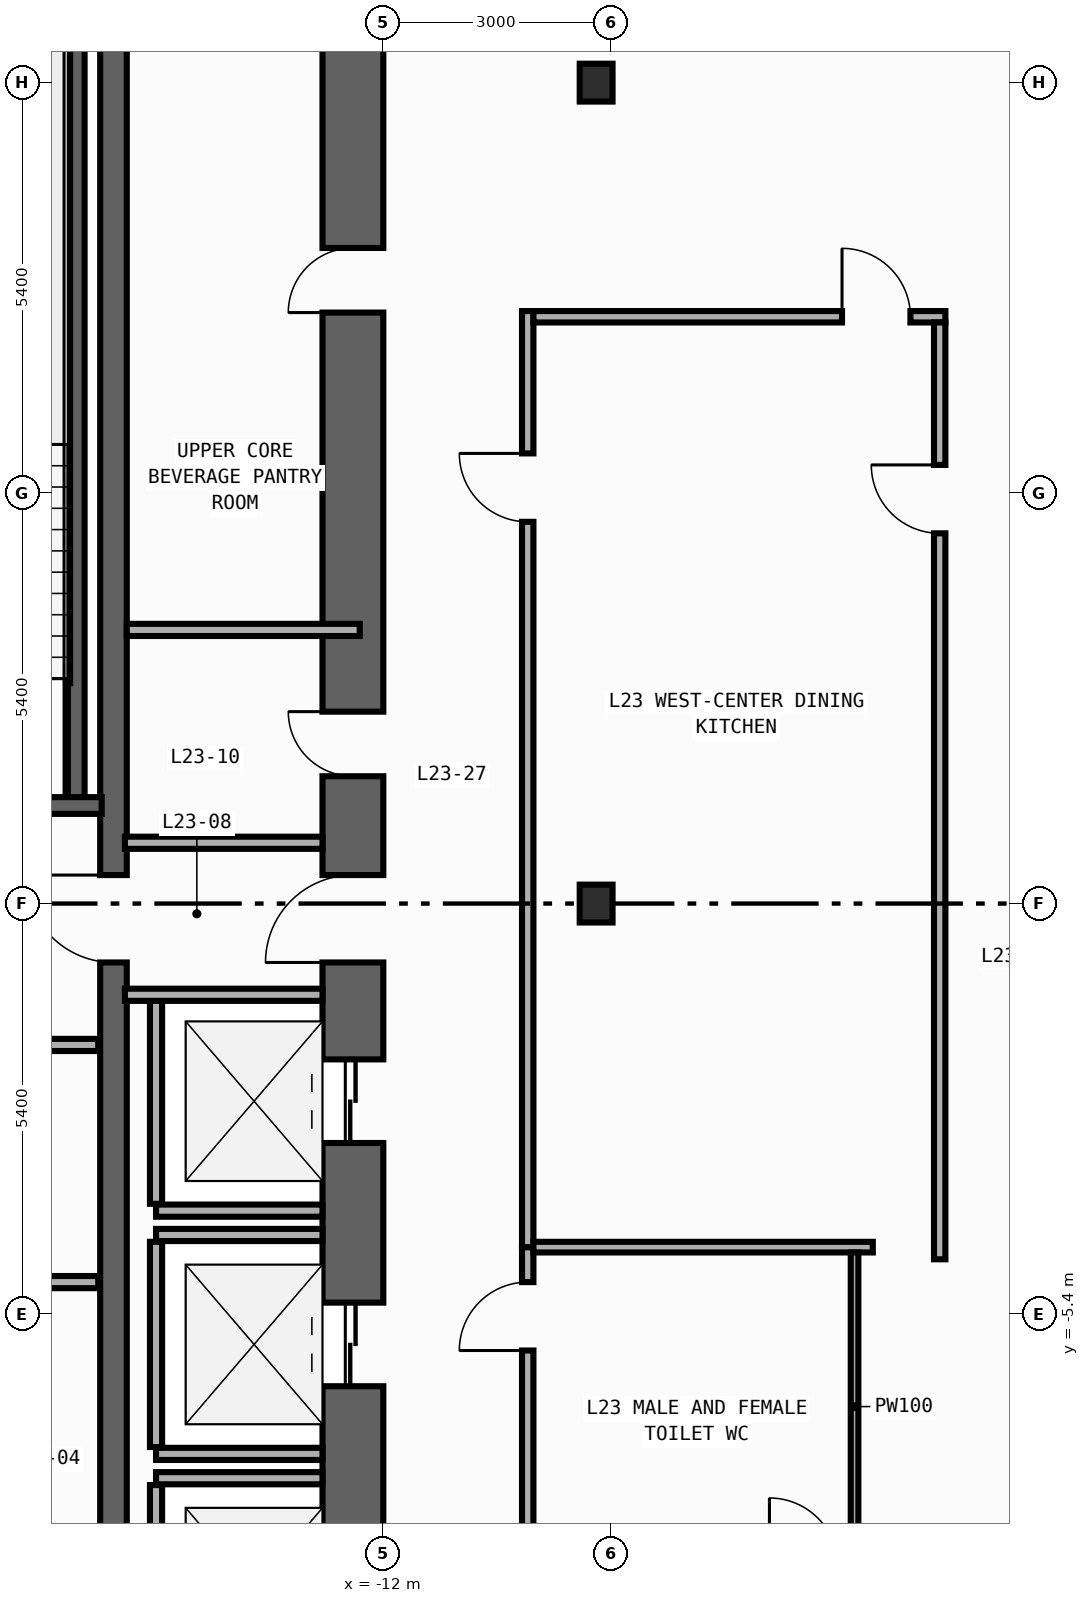
"""IFC4 building model, lengths in metres.
Left out: names, types, materials, properties, quantities, classifications, styles, units other than length and angle.
Written with IfcOpenShell. Run it as: python <this file> out.ifc"""

import sys

from ifc_helpers import new_model, si_unit, direction, frame, frame_2d, origin, origin_2d, place, context, subcontext, project, spatial, rectangle, i_section, extrude, element, fill, save


model = new_model("IFC4")
c1 = context("Model", 3, precision=1e-05, world=origin(), true_north=direction((0.0, 1.0)))
c2 = subcontext(c1, "Body", "Model", "MODEL_VIEW")
j1 = project(units=[si_unit("LENGTHUNIT", "METRE"), si_unit("PLANEANGLEUNIT", "RADIAN")], contexts=[c1])
p1 = place(None, origin())
s1 = spatial("IfcSite", under=j1, at=p1, CompositionType="ELEMENT")
p2 = place(p1, origin())
s2 = spatial("IfcBuilding", under=s1, at=p2, CompositionType="ELEMENT")
p3 = place(p2, frame((0.0, 0.0, 101.6)))
s3 = spatial("IfcBuildingStorey", under=s2, at=p3, CompositionType="ELEMENT", Elevation=101.6)
p4 = place(p3, frame((-12.4, -13.5, 0.0), z_axis=(0.0, 0.0, 1.0), x_axis=(0.0, 1.0, 0.0)))
e1 = element("IfcWall", 1, at=p4, inside=s3, PredefinedType="SHEAR", context=c2, shape_type="SweptSolid", body=[
    extrude(rectangle(XDim=27.0, YDim=0.8, at=frame_2d((13.5, 0.0))), origin(), (0.0, 0.0, 1.0), 3.94),
])
p5 = place(p4, frame((10.35, 0.0, 0.0)))
e2 = element("IfcOpeningElement", 2, at=p5, cuts=e1, PredefinedType="OPENING", context=c2, shape_type="SweptSolid", body=[
    extrude(rectangle(XDim=1.1, YDim=2.2, at=frame_2d((0.55, 1.1))), frame((0.0, 0.41, 0.0), z_axis=(0.0, -1.0, 0.0), x_axis=(1.0, 0.0, 0.0)), (0.0, 0.0, 1.0), 0.82),
])
p6 = place(p4, frame((7.15, 0.0, 0.0)))
e3 = element("IfcOpeningElement", 3, at=p6, cuts=e1, PredefinedType="OPENING", context=c2, shape_type="SweptSolid", body=[
    extrude(rectangle(XDim=1.1, YDim=2.2, at=frame_2d((0.55, 1.1))), frame((0.0, 0.41, 0.0), z_axis=(0.0, -1.0, 0.0), x_axis=(1.0, 0.0, 0.0)), (0.0, 0.0, 1.0), 0.82),
])
p7 = place(p4, frame((3.95, 0.0, 0.0)))
e4 = element("IfcOpeningElement", 4, at=p7, cuts=e1, PredefinedType="OPENING", context=c2, shape_type="SweptSolid", body=[
    extrude(rectangle(XDim=1.1, YDim=2.2, at=frame_2d((0.55, 1.1))), frame((0.0, 0.41, 0.0), z_axis=(0.0, -1.0, 0.0), x_axis=(1.0, 0.0, 0.0)), (0.0, 0.0, 1.0), 0.82),
])
p8 = place(p4, frame((15.175, 0.0, 0.0)))
e5 = element("IfcOpeningElement", 5, at=p8, cuts=e1, PredefinedType="OPENING", context=c2, shape_type="SweptSolid", body=[
    extrude(rectangle(XDim=0.85, YDim=2.1, at=frame_2d((0.425, 1.05))), frame((0.0, 0.41, 0.0), z_axis=(0.0, -1.0, 0.0), x_axis=(1.0, 0.0, 0.0)), (0.0, 0.0, 1.0), 0.82),
])
p9 = place(p4, frame((21.275, 0.0, 0.0)))
e6 = element("IfcOpeningElement", 6, at=p9, cuts=e1, PredefinedType="OPENING", context=c2, shape_type="SweptSolid", body=[
    extrude(rectangle(XDim=0.85, YDim=2.1, at=frame_2d((0.425, 1.05))), frame((0.0, 0.41, 0.0), z_axis=(0.0, -1.0, 0.0), x_axis=(1.0, 0.0, 0.0)), (0.0, 0.0, 1.0), 0.82),
])
p10 = place(p4, frame((12.725, 0.0, 0.0)))
e7 = element("IfcOpeningElement", 7, at=p10, cuts=e1, PredefinedType="OPENING", context=c2, shape_type="SweptSolid", body=[
    extrude(rectangle(XDim=1.15, YDim=2.2, at=frame_2d((0.575, 1.1))), frame((0.0, 0.41, 0.0), z_axis=(0.0, -1.0, 0.0), x_axis=(1.0, 0.0, 0.0)), (0.0, 0.0, 1.0), 0.82),
])
p11 = place(p4, frame((1.625, 0.0, 0.0)))
e8 = element("IfcOpeningElement", 8, at=p11, cuts=e1, PredefinedType="OPENING", context=c2, shape_type="SweptSolid", body=[
    extrude(rectangle(XDim=0.85, YDim=2.1, at=frame_2d((0.425, 1.05))), frame((0.0, 0.41, 0.0), z_axis=(0.0, -1.0, 0.0), x_axis=(1.0, 0.0, 0.0)), (0.0, 0.0, 1.0), 0.82),
])
p12 = place(p3, frame((-15.55, -12.7, 0.0), z_axis=(0.0, 0.0, 1.0), x_axis=(0.0, 1.0, 0.0)))
e9 = element("IfcWall", 9, at=p12, inside=s3, PredefinedType="SHEAR", context=c2, shape_type="SweptSolid", body=[
    extrude(rectangle(XDim=25.4, YDim=0.35, at=frame_2d((12.7, 0.0))), origin(), (0.0, 0.0, 1.0), 3.94),
])
p13 = place(p12, frame((11.925, 0.0, 0.0)))
e10 = element("IfcOpeningElement", 10, at=p13, cuts=e9, PredefinedType="OPENING", context=c2, shape_type="SweptSolid", body=[
    extrude(rectangle(XDim=1.15, YDim=2.2, at=frame_2d((0.575, 1.1))), frame((0.0, 0.185, 0.0), z_axis=(0.0, -1.0, 0.0), x_axis=(1.0, 0.0, 0.0)), (0.0, 0.0, 1.0), 0.37),
])
p14 = place(p12, frame((0.825, 0.0, 0.0)))
e11 = element("IfcOpeningElement", 11, at=p14, cuts=e9, PredefinedType="OPENING", context=c2, shape_type="SweptSolid", body=[
    extrude(rectangle(XDim=0.85, YDim=2.1, at=frame_2d((0.425, 1.05))), frame((0.0, 0.185, 0.0), z_axis=(0.0, -1.0, 0.0), x_axis=(1.0, 0.0, 0.0)), (0.0, 0.0, 1.0), 0.37),
])
p15 = place(p3, frame((-16.04, 1.29, 0.0), z_axis=(0.0, 0.0, 1.0), x_axis=(0.0, 1.0, 0.0)))
e12 = element("IfcWall", 12, at=p15, inside=s3, PredefinedType="SHEAR", context=c2, shape_type="SweptSolid", body=[
    extrude(rectangle(XDim=11.3, YDim=0.22, at=frame_2d((5.65, 0.0))), origin(), (0.0, 0.0, 1.0), 3.94),
])
p16 = place(p3, frame((-19.62, 1.29, 0.0), z_axis=(0.0, 0.0, 1.0), x_axis=(1.0, 0.0, 0.0)))
e13 = element("IfcWall", 13, at=p16, inside=s3, PredefinedType="SHEAR", context=c2, shape_type="SweptSolid", body=[
    extrude(rectangle(XDim=3.915, YDim=0.22, at=frame_2d((1.958, 0.0))), origin(), (0.0, 0.0, 1.0), 3.94),
])
p17 = place(p16, frame((1.08, 0.0, 0.0)))
e14 = element("IfcOpeningElement", 14, at=p17, cuts=e13, PredefinedType="OPENING", context=c2, shape_type="SweptSolid", body=[
    extrude(rectangle(XDim=1.1, YDim=2.2, at=frame_2d((0.55, 1.1))), frame((0.0, 0.12, 0.0), z_axis=(0.0, -1.0, 0.0), x_axis=(1.0, 0.0, 0.0)), (0.0, 0.0, 1.0), 0.24),
])
for number, where, z_axis, x_axis in (
    (15, (-9.2, 0.0, 0.0), (0.0, 0.0, 1.0), (1.0, 0.0, 0.0)),
    (16, (-9.2, 10.8, 0.0), (0.0, 0.0, 1.0), (1.0, 0.0, 0.0)),
):
    element("IfcColumn", number, at=place(p3, frame(where, z_axis=z_axis, x_axis=x_axis)), inside=s3, PredefinedType="COLUMN", context=c2, shape_type="SweptSolid", body=[
        extrude(i_section(OverallWidth=0.432, OverallDepth=0.498, WebThickness=0.045, FlangeThickness=0.07, FilletRadius=0.022, at=origin_2d()), origin(), (0.0, 0.0, 1.0), 4.2),
    ])
p18 = place(p3, frame((-14.99, -4.04, 0.0), z_axis=(0.0, 0.0, 1.0), x_axis=(1.0, 0.0, 0.0)))
e17 = element("IfcWall", 17, at=p18, inside=s3, PredefinedType="STANDARD", context=c2, shape_type="SweptSolid", body=[
    extrude(rectangle(XDim=2.19, YDim=0.16, at=frame_2d((1.095, 0.0))), origin(), (0.0, 0.0, 1.0), 3.94),
])
p19 = place(p3, frame((-14.99, -3.95, 0.0), z_axis=(0.0, 0.0, 1.0), x_axis=(0.0, 1.0, 0.0)))
e18 = element("IfcWall", 18, at=p19, inside=s3, PredefinedType="STANDARD", context=c2, shape_type="SweptSolid", body=[
    extrude(rectangle(XDim=2.7, YDim=0.16, at=frame_2d((1.35, 0.0))), origin(), (0.0, 0.0, 1.0), 3.94),
])
for number, where, z_axis, x_axis in (
    (19, (-14.99, -7.24, 0.0), (0.0, 0.0, 1.0), (1.0, 0.0, 0.0)),
    (20, (-14.99, -4.36, 0.0), (0.0, 0.0, 1.0), (1.0, 0.0, 0.0)),
):
    element("IfcWall", number, at=place(p3, frame(where, z_axis=z_axis, x_axis=x_axis)), inside=s3, PredefinedType="STANDARD", context=c2, shape_type="SweptSolid", body=[
        extrude(rectangle(XDim=2.19, YDim=0.16, at=frame_2d((1.095, 0.0))), origin(), (0.0, 0.0, 1.0), 3.94),
    ])
p20 = place(p3, frame((-14.99, -7.15, 0.0), z_axis=(0.0, 0.0, 1.0), x_axis=(0.0, 1.0, 0.0)))
e21 = element("IfcWall", 21, at=p20, inside=s3, PredefinedType="STANDARD", context=c2, shape_type="SweptSolid", body=[
    extrude(rectangle(XDim=2.7, YDim=0.16, at=frame_2d((1.35, 0.0))), origin(), (0.0, 0.0, 1.0), 3.94),
])
p21 = place(p3, frame((-14.99, -7.56, 0.0), z_axis=(0.0, 0.0, 1.0), x_axis=(1.0, 0.0, 0.0)))
e22 = element("IfcWall", 22, at=p21, inside=s3, PredefinedType="STANDARD", context=c2, shape_type="SweptSolid", body=[
    extrude(rectangle(XDim=2.19, YDim=0.16, at=frame_2d((1.095, 0.0))), origin(), (0.0, 0.0, 1.0), 3.94),
])
p22 = place(p3, frame((-14.99, -10.35, 0.0), z_axis=(0.0, 0.0, 1.0), x_axis=(0.0, 1.0, 0.0)))
e23 = element("IfcWall", 23, at=p22, inside=s3, PredefinedType="STANDARD", context=c2, shape_type="SweptSolid", body=[
    extrude(rectangle(XDim=2.7, YDim=0.16, at=frame_2d((1.35, 0.0))), origin(), (0.0, 0.0, 1.0), 3.94),
])
p23 = place(p3, frame((-19.55, -1.86, 0.0), z_axis=(0.0, 0.0, 1.0), x_axis=(1.0, 0.0, 0.0)))
e24 = element("IfcWall", 24, at=p23, inside=s3, PredefinedType="STANDARD", context=c2, shape_type="SweptSolid", body=[
    extrude(rectangle(XDim=3.8, YDim=0.16, at=frame_2d((1.9, 0.0))), origin(), (0.0, 0.0, 1.0), 3.94),
])
p24 = place(p23, frame((1.18, 0.0, 0.0)))
e25 = element("IfcOpeningElement", 25, at=p24, cuts=e24, PredefinedType="OPENING", context=c2, shape_type="SweptSolid", body=[
    extrude(rectangle(XDim=1.15, YDim=2.2, at=frame_2d((0.575, 1.1))), frame((0.0, 0.09, 0.0), z_axis=(0.0, -1.0, 0.0), x_axis=(1.0, 0.0, 0.0)), (0.0, 0.0, 1.0), 0.18),
])
p25 = place(p3, frame((-19.55, -4.98, 0.0), z_axis=(0.0, 0.0, 1.0), x_axis=(1.0, 0.0, 0.0)))
e26 = element("IfcWall", 26, at=p25, inside=s3, PredefinedType="STANDARD", context=c2, shape_type="SweptSolid", body=[
    extrude(rectangle(XDim=3.8, YDim=0.16, at=frame_2d((1.9, 0.0))), origin(), (0.0, 0.0, 1.0), 3.94),
])
for number, where, z_axis, x_axis in (
    (27, (-15.4, 0.8, 0.0), (0.0, 0.0, 1.0), (1.0, 0.0, 0.0)),
    (28, (-15.4, -1.2, 0.0), (0.0, 0.0, 1.0), (1.0, 0.0, 0.0)),
):
    element("IfcWall", number, at=place(p3, frame(where, z_axis=z_axis, x_axis=x_axis)), inside=s3, PredefinedType="STANDARD", context=c2, shape_type="SweptSolid", body=[
        extrude(rectangle(XDim=2.6, YDim=0.16, at=frame_2d((1.3, 0.0))), origin(), (0.0, 0.0, 1.0), 3.94),
    ])
p26 = place(p3, frame((-15.375, 3.6, 0.0), z_axis=(0.0, 0.0, 1.0), x_axis=(1.0, 0.0, 0.0)))
e29 = element("IfcWall", 29, at=p26, inside=s3, PredefinedType="PARTITIONING", context=c2, shape_type="SweptSolid", body=[
    extrude(rectangle(XDim=3.065, YDim=0.16, at=frame_2d((1.532, 0.0))), origin(), (0.0, 0.0, 1.0), 3.94),
])
p27 = place(p3, frame((-10.1, -8.795, 0.0), z_axis=(0.0, 0.0, 1.0), x_axis=(0.0, 1.0, 0.0)))
e30 = element("IfcWall", 30, at=p27, inside=s3, PredefinedType="PARTITIONING", context=c2, shape_type="SweptSolid", body=[
    extrude(rectangle(XDim=4.275, YDim=0.15, at=frame_2d((2.137, 0.0))), origin(), (0.0, 0.0, 1.0), 3.94),
])
p28 = place(p27, frame((2.915, 0.0, 0.0)))
e31 = element("IfcOpeningElement", 31, at=p28, cuts=e30, PredefinedType="OPENING", context=c2, shape_type="SweptSolid", body=[
    extrude(rectangle(XDim=0.9, YDim=2.15, at=frame_2d((0.45, 1.075))), frame((0.0, 0.085, 0.0), z_axis=(0.0, -1.0, 0.0), x_axis=(1.0, 0.0, 0.0)), (0.0, 0.0, 1.0), 0.17),
])
p29 = place(p3, frame((-10.1, -4.52, 0.0), z_axis=(0.0, 0.0, 1.0), x_axis=(0.0, 1.0, 0.0)))
e32 = element("IfcWall", 32, at=p29, inside=s3, PredefinedType="PARTITIONING", context=c2, shape_type="SweptSolid", body=[
    extrude(rectangle(XDim=12.315, YDim=0.15, at=frame_2d((6.157, 0.0))), origin(), (0.0, 0.0, 1.0), 3.94),
])
p30 = place(p29, frame((9.542, 0.0, 0.0)))
e33 = element("IfcOpeningElement", 33, at=p30, cuts=e32, PredefinedType="OPENING", context=c2, shape_type="SweptSolid", body=[
    extrude(rectangle(XDim=0.9, YDim=2.15, at=frame_2d((0.45, 1.075))), frame((0.0, 0.085, 0.0), z_axis=(0.0, -1.0, 0.0), x_axis=(1.0, 0.0, 0.0)), (0.0, 0.0, 1.0), 0.17),
])
p31 = place(p3, frame((-10.025, 7.72, 0.0), z_axis=(0.0, 0.0, 1.0), x_axis=(1.0, 0.0, 0.0)))
e34 = element("IfcWall", 34, at=p31, inside=s3, PredefinedType="PARTITIONING", context=c2, shape_type="SweptSolid", body=[
    extrude(rectangle(XDim=5.42, YDim=0.15, at=frame_2d((2.71, 0.0))), origin(), (0.0, 0.0, 1.0), 3.94),
])
p32 = place(p31, frame((4.06, 0.0, 0.0)))
e35 = element("IfcOpeningElement", 35, at=p32, cuts=e34, PredefinedType="OPENING", context=c2, shape_type="SweptSolid", body=[
    extrude(rectangle(XDim=0.9, YDim=2.15, at=frame_2d((0.45, 1.075))), frame((0.0, 0.085, 0.0), z_axis=(0.0, -1.0, 0.0), x_axis=(1.0, 0.0, 0.0)), (0.0, 0.0, 1.0), 0.17),
])
p33 = place(p3, frame((-4.68, -4.68, 0.0), z_axis=(0.0, 0.0, 1.0), x_axis=(0.0, 1.0, 0.0)))
e36 = element("IfcWall", 36, at=p33, inside=s3, PredefinedType="PARTITIONING", context=c2, shape_type="SweptSolid", body=[
    extrude(rectangle(XDim=12.325, YDim=0.15, at=frame_2d((6.163, 0.0))), origin(), (0.0, 0.0, 1.0), 3.49),
])
p34 = place(p33, frame((9.551, 0.0, 0.0)))
e37 = element("IfcOpeningElement", 37, at=p34, cuts=e36, PredefinedType="OPENING", context=c2, shape_type="SweptSolid", body=[
    extrude(rectangle(XDim=0.9, YDim=2.15, at=frame_2d((0.45, 1.075))), frame((0.0, 0.085, 0.0), z_axis=(0.0, -1.0, 0.0), x_axis=(1.0, 0.0, 0.0)), (0.0, 0.0, 1.0), 0.17),
])
p35 = place(p3, frame((-10.025, -4.52, 0.0), z_axis=(0.0, 0.0, 1.0), x_axis=(1.0, 0.0, 0.0)))
e38 = element("IfcWall", 38, at=p35, inside=s3, PredefinedType="PARTITIONING", context=c2, shape_type="SweptSolid", body=[
    extrude(rectangle(XDim=4.465, YDim=0.14, at=frame_2d((2.232, 0.0))), origin(), (0.0, 0.0, 1.0), 3.94),
])
p36 = place(p3, frame((-5.8, -4.59, 0.0), z_axis=(0.0, 0.0, 1.0), x_axis=(0.0, -1.0, 0.0)))
e39 = element("IfcWall", 39, at=p36, inside=s3, PredefinedType="PARTITIONING", context=c2, shape_type="SweptSolid", body=[
    extrude(rectangle(XDim=4.055, YDim=0.1, at=frame_2d((2.027, 0.0))), origin(), (0.0, 0.0, 1.0), 3.94),
])
p37 = place(p5, origin())
e40 = element("IfcDoor", 40, at=p37, inside=s3, OperationType="DOUBLE_DOOR_SLIDING", PredefinedType="DOOR", context=c2, shape_type="SweptSolid", body=[
    extrude(rectangle(XDim=1.1, YDim=2.2, at=frame_2d((0.55, 1.1))), frame((0.0, 0.025, 0.0), z_axis=(0.0, -1.0, 0.0), x_axis=(1.0, 0.0, 0.0)), (0.0, 0.0, 1.0), 0.05),
])
fill(e2, e40)
p38 = place(p6, origin())
e41 = element("IfcDoor", 41, at=p38, inside=s3, OperationType="DOUBLE_DOOR_SLIDING", PredefinedType="DOOR", context=c2, shape_type="SweptSolid", body=[
    extrude(rectangle(XDim=1.1, YDim=2.2, at=frame_2d((0.55, 1.1))), frame((0.0, 0.025, 0.0), z_axis=(0.0, -1.0, 0.0), x_axis=(1.0, 0.0, 0.0)), (0.0, 0.0, 1.0), 0.05),
])
fill(e3, e41)
p39 = place(p8, origin())
e42 = element("IfcDoor", 42, at=p39, inside=s3, OperationType="SINGLE_SWING_RIGHT", PredefinedType="DOOR", context=c2, shape_type="SweptSolid", body=[
    extrude(rectangle(XDim=0.85, YDim=2.1, at=frame_2d((0.425, 1.05))), frame((0.0, 0.025, 0.0), z_axis=(0.0, -1.0, 0.0), x_axis=(1.0, 0.0, 0.0)), (0.0, 0.0, 1.0), 0.05),
])
fill(e5, e42)
p40 = place(p9, origin())
e43 = element("IfcDoor", 43, at=p40, inside=s3, OperationType="SINGLE_SWING_LEFT", PredefinedType="DOOR", context=c2, shape_type="SweptSolid", body=[
    extrude(rectangle(XDim=0.85, YDim=2.1, at=frame_2d((0.425, 1.05))), frame((0.0, 0.025, 0.0), z_axis=(0.0, -1.0, 0.0), x_axis=(1.0, 0.0, 0.0)), (0.0, 0.0, 1.0), 0.05),
])
fill(e6, e43)
p41 = place(p10, origin())
e44 = element("IfcDoor", 44, at=p41, inside=s3, OperationType="SINGLE_SWING_LEFT", PredefinedType="DOOR", context=c2, shape_type="SweptSolid", body=[
    extrude(rectangle(XDim=1.15, YDim=2.2, at=frame_2d((0.575, 1.1))), frame((0.0, 0.025, 0.0), z_axis=(0.0, -1.0, 0.0), x_axis=(1.0, 0.0, 0.0)), (0.0, 0.0, 1.0), 0.05),
])
fill(e7, e44)
p42 = place(p13, origin())
e45 = element("IfcDoor", 45, at=p42, inside=s3, OperationType="SINGLE_SWING_RIGHT", PredefinedType="DOOR", context=c2, shape_type="SweptSolid", body=[
    extrude(rectangle(XDim=1.15, YDim=2.2, at=frame_2d((0.575, 1.1))), frame((0.0, 0.025, 0.0), z_axis=(0.0, -1.0, 0.0), x_axis=(1.0, 0.0, 0.0)), (0.0, 0.0, 1.0), 0.05),
])
fill(e10, e45)
p43 = place(p28, origin())
e46 = element("IfcDoor", 46, at=p43, inside=s3, OperationType="SINGLE_SWING_LEFT", PredefinedType="DOOR", context=c2, shape_type="SweptSolid", body=[
    extrude(rectangle(XDim=0.9, YDim=2.15, at=frame_2d((0.45, 1.075))), frame((0.0, 0.025, 0.0), z_axis=(0.0, -1.0, 0.0), x_axis=(1.0, 0.0, 0.0)), (0.0, 0.0, 1.0), 0.05),
])
fill(e31, e46)
p44 = place(p30, origin())
e47 = element("IfcDoor", 47, at=p44, inside=s3, OperationType="SINGLE_SWING_RIGHT", PredefinedType="DOOR", context=c2, shape_type="SweptSolid", body=[
    extrude(rectangle(XDim=0.9, YDim=2.15, at=frame_2d((0.45, 1.075))), frame((0.0, 0.025, 0.0), z_axis=(0.0, -1.0, 0.0), x_axis=(1.0, 0.0, 0.0)), (0.0, 0.0, 1.0), 0.05),
])
fill(e33, e47)
p45 = place(p32, origin())
e48 = element("IfcDoor", 48, at=p45, inside=s3, OperationType="SINGLE_SWING_LEFT", PredefinedType="DOOR", context=c2, shape_type="SweptSolid", body=[
    extrude(rectangle(XDim=0.9, YDim=2.15, at=frame_2d((0.45, 1.075))), frame((0.0, 0.025, 0.0), z_axis=(0.0, -1.0, 0.0), x_axis=(1.0, 0.0, 0.0)), (0.0, 0.0, 1.0), 0.05),
])
fill(e35, e48)
p46 = place(p34, origin())
e49 = element("IfcDoor", 49, at=p46, inside=s3, OperationType="SINGLE_SWING_RIGHT", PredefinedType="DOOR", context=c2, shape_type="SweptSolid", body=[
    extrude(rectangle(XDim=0.9, YDim=2.15, at=frame_2d((0.45, 1.075))), frame((0.0, 0.025, 0.0), z_axis=(0.0, -1.0, 0.0), x_axis=(1.0, 0.0, 0.0)), (0.0, 0.0, 1.0), 0.05),
])
fill(e37, e49)
save(model, sys.argv[1])
